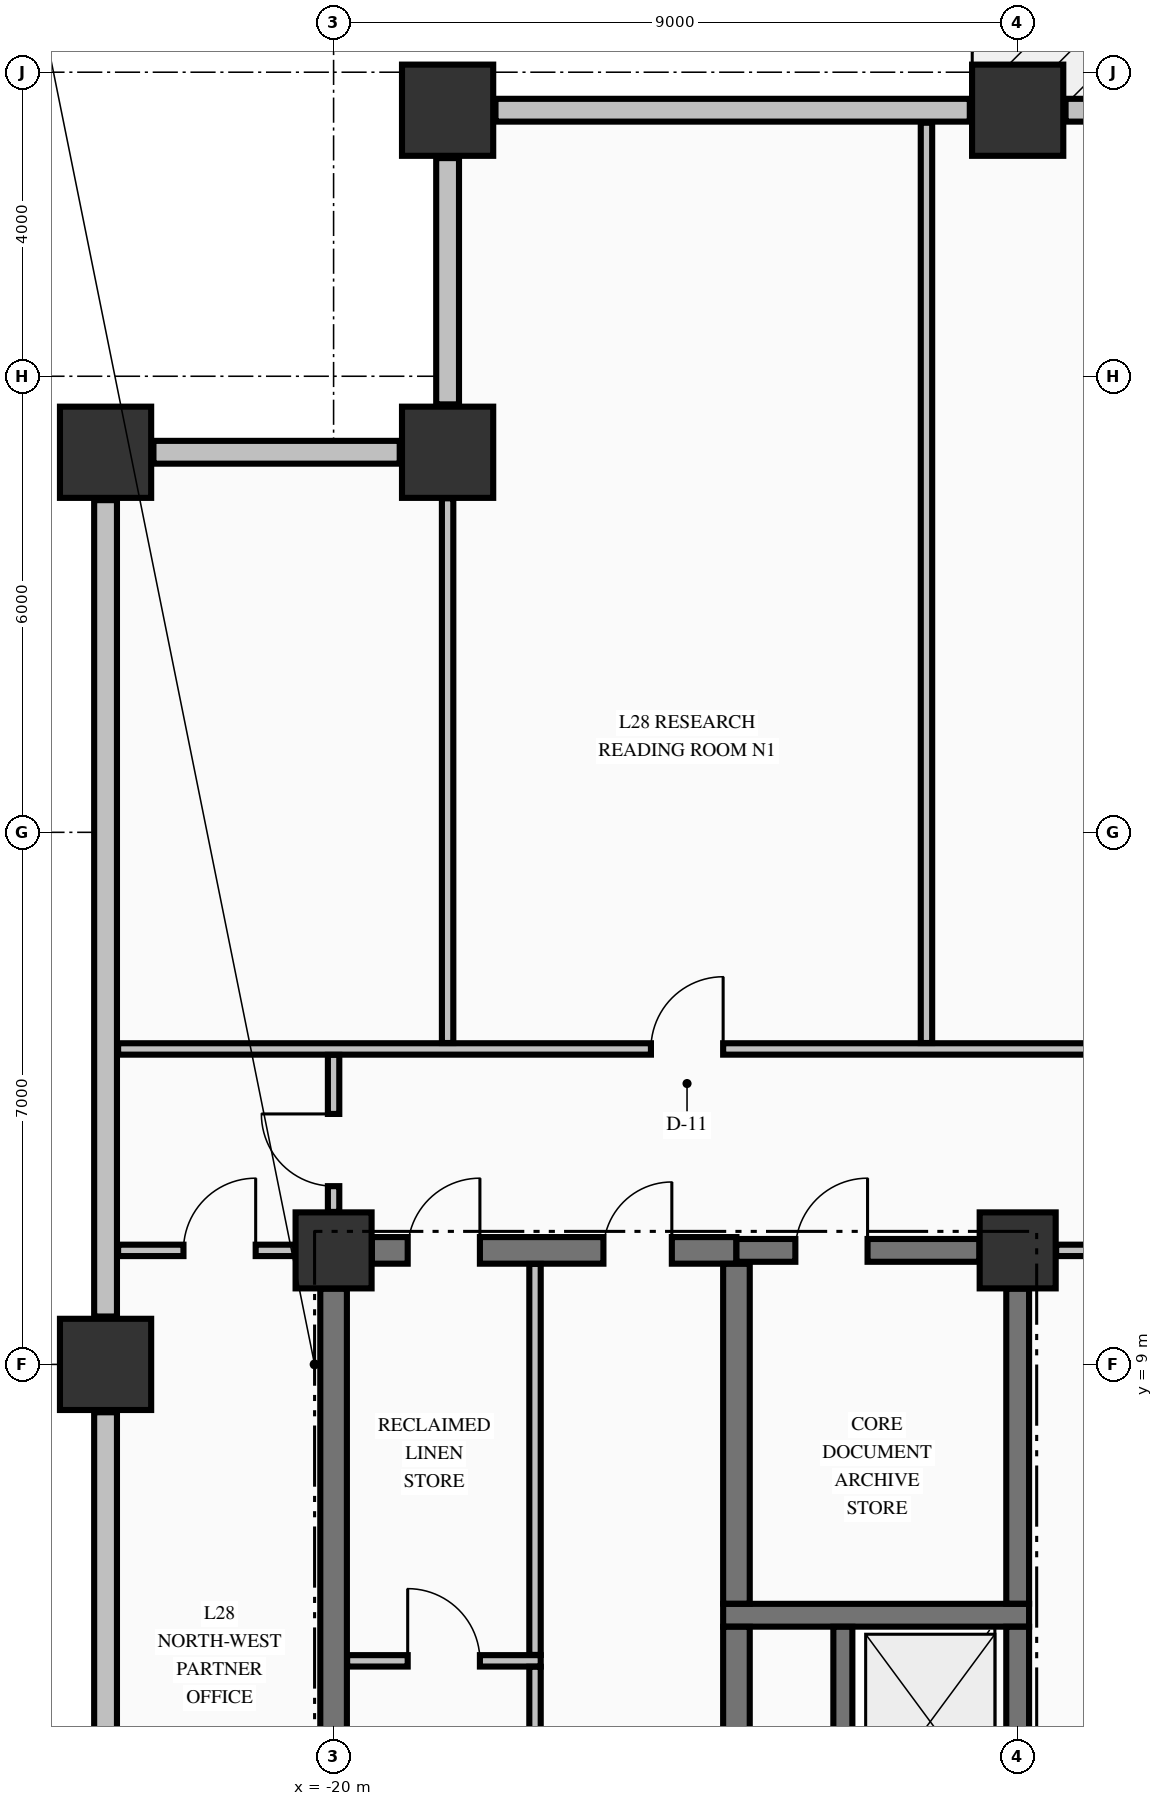
"""IFC4 building model, lengths in metres.
Left out: names, types, materials, properties, quantities, classifications, styles, units other than length and angle.
Written with IfcOpenShell. Run it as: python <this file> out.ifc"""

import sys

from ifc_helpers import new_model, si_unit, direction, frame, frame_2d, origin, origin_2d, place, context, subcontext, project, spatial, rectangle, extrude, element, fill, save


model = new_model("IFC4")
c1 = context("Model", 3, precision=1e-05, world=origin(), true_north=direction((0.0, 1.0)))
c2 = subcontext(c1, "Body", "Model", "MODEL_VIEW")
j1 = project(units=[si_unit("LENGTHUNIT", "METRE"), si_unit("PLANEANGLEUNIT", "RADIAN")], contexts=[c1])
p1 = place(None, origin())
s1 = spatial("IfcSite", under=j1, at=p1, CompositionType="ELEMENT")
p2 = place(p1, origin())
s2 = spatial("IfcBuilding", under=s1, at=p2, CompositionType="ELEMENT")
p3 = place(p2, frame((0.0, 0.0, 112.78)))
s3 = spatial("IfcBuildingStorey", under=s2, at=p3, CompositionType="ELEMENT", Elevation=112.78)
for number, where, z_axis, x_axis in (
    (1, (-18.5, 25.5, -0.25), (0.0, 0.0, 1.0), (1.0, 0.0, 0.0)),
    (2, (-11.0, 25.5, -0.25), (0.0, 0.0, 1.0), (1.0, 0.0, 0.0)),
    (3, (-23.0, 9.0, -0.25), (0.0, 0.0, 1.0), (1.0, 0.0, 0.0)),
    (4, (-23.0, 21.0, -0.25), (0.0, 0.0, 1.0), (1.0, 0.0, 0.0)),
    (5, (-18.5, 21.0, -0.25), (0.0, 0.0, 1.0), (1.0, 0.0, 0.0)),
):
    element("IfcColumn", number, at=place(p3, frame(where, z_axis=z_axis, x_axis=x_axis)), inside=s3, PredefinedType="COLUMN", context=c2, shape_type="SweptSolid", body=[
        extrude(rectangle(XDim=1.2, YDim=1.2, at=origin_2d()), origin(), (0.0, 0.0, 1.0), 3.395),
    ])
for number, where, z_axis, x_axis in (
    (6, (-20.0, 10.5, -0.25), (0.0, 0.0, 1.0), (1.0, 0.0, 0.0)),
    (7, (-11.0, 10.5, -0.25), (0.0, 0.0, 1.0), (1.0, 0.0, 0.0)),
):
    element("IfcColumn", number, at=place(p3, frame(where, z_axis=z_axis, x_axis=x_axis)), inside=s3, PredefinedType="COLUMN", context=c2, shape_type="SweptSolid", body=[
        extrude(rectangle(XDim=1.0, YDim=1.0, at=origin_2d()), origin(), (0.0, 0.0, 1.0), 3.395),
    ])
for number, where, z_axis, x_axis in (
    (8, (-18.5, 24.87, 0.0), (0.0, 0.0, 1.0), (0.0, -1.0, 0.0)),
    (9, (-19.13, 21.0, 0.0), (0.0, 0.0, 1.0), (-1.0, 0.0, 0.0)),
):
    element("IfcWall", number, at=place(p3, frame(where, z_axis=z_axis, x_axis=x_axis)), inside=s3, PredefinedType="STANDARD", context=c2, shape_type="SweptSolid", body=[
        extrude(rectangle(XDim=3.24, YDim=0.3, at=frame_2d((1.62, 0.0))), origin(), (0.0, 0.0, 1.0), 2.537),
    ])
p4 = place(p3, frame((-11.63, 25.5, 0.0), z_axis=(0.0, 0.0, 1.0), x_axis=(-1.0, 0.0, 0.0)))
e10 = element("IfcWall", 10, at=p4, inside=s3, PredefinedType="STANDARD", context=c2, shape_type="SweptSolid", body=[
    extrude(rectangle(XDim=6.24, YDim=0.3, at=frame_2d((3.12, 0.0))), origin(), (0.0, 0.0, 1.0), 2.537),
])
p5 = place(p3, frame((-0.63, 25.5, 0.0), z_axis=(0.0, 0.0, 1.0), x_axis=(-1.0, 0.0, 0.0)))
e11 = element("IfcWall", 11, at=p5, inside=s3, PredefinedType="STANDARD", context=c2, shape_type="SweptSolid", body=[
    extrude(rectangle(XDim=9.74, YDim=0.3, at=frame_2d((4.87, 0.0))), origin(), (0.0, 0.0, 1.0), 2.537),
])
p6 = place(p5, frame((6.38, 0.0, 0.0)))
e12 = element("IfcOpeningElement", 12, at=p6, cuts=e11, PredefinedType="OPENING", context=c2, shape_type="SweptSolid", body=[
    extrude(rectangle(XDim=1.1, YDim=2.15, at=frame_2d((0.55, 1.075))), frame((0.0, 0.16, 0.0), z_axis=(0.0, -1.0, 0.0), x_axis=(1.0, 0.0, 0.0)), (0.0, 0.0, 1.0), 0.32),
])
p7 = place(p3, frame((-23.0, 8.37, 0.0), z_axis=(0.0, 0.0, 1.0), x_axis=(0.0, -1.0, 0.0)))
e13 = element("IfcWall", 13, at=p7, inside=s3, PredefinedType="STANDARD", context=c2, shape_type="SweptSolid", body=[
    extrude(rectangle(XDim=7.74, YDim=0.3, at=frame_2d((3.87, 0.0))), origin(), (0.0, 0.0, 1.0), 2.537),
])
p8 = place(p3, frame((-23.0, 20.37, 0.0), z_axis=(0.0, 0.0, 1.0), x_axis=(0.0, -1.0, 0.0)))
e14 = element("IfcWall", 14, at=p8, inside=s3, PredefinedType="STANDARD", context=c2, shape_type="SweptSolid", body=[
    extrude(rectangle(XDim=10.74, YDim=0.3, at=frame_2d((5.37, 0.0))), origin(), (0.0, 0.0, 1.0), 2.537),
])
p9 = place(p3, frame((-14.875, 5.7, 0.0), z_axis=(0.0, 0.0, 1.0), x_axis=(1.0, 0.0, 0.0)))
e15 = element("IfcWall", 15, at=p9, inside=s3, PredefinedType="SHEAR", context=c2, shape_type="SweptSolid", body=[
    extrude(rectangle(XDim=4.025, YDim=0.3, at=frame_2d((2.012, 0.0))), origin(), (0.0, 0.0, 1.0), 3.145),
])
p10 = place(p3, frame((-19.496, 10.5, 0.0), z_axis=(0.0, 0.0, 1.0), x_axis=(1.0, 0.0, 0.0)))
e16 = element("IfcWall", 16, at=p10, inside=s3, PredefinedType="SHEAR", context=c2, shape_type="SweptSolid", body=[
    extrude(rectangle(XDim=4.796, YDim=0.35, at=frame_2d((2.398, 0.0))), origin(), (0.0, 0.0, 1.0), 3.145),
])
p11 = place(p10, frame((0.471, 0.0, 0.0)))
e17 = element("IfcOpeningElement", 17, at=p11, cuts=e16, PredefinedType="OPENING", context=c2, shape_type="SweptSolid", body=[
    extrude(rectangle(XDim=0.95, YDim=2.15, at=frame_2d((0.475, 1.075))), frame((0.0, 0.185, 0.0), z_axis=(0.0, -1.0, 0.0), x_axis=(1.0, 0.0, 0.0)), (0.0, 0.0, 1.0), 0.37),
])
p12 = place(p10, frame((3.046, 0.0, 0.0)))
e18 = element("IfcOpeningElement", 18, at=p12, cuts=e16, PredefinedType="OPENING", context=c2, shape_type="SweptSolid", body=[
    extrude(rectangle(XDim=0.9, YDim=2.15, at=frame_2d((0.45, 1.075))), frame((0.0, 0.185, 0.0), z_axis=(0.0, -1.0, 0.0), x_axis=(1.0, 0.0, 0.0)), (0.0, 0.0, 1.0), 0.37),
])
p13 = place(p3, frame((-14.7, 10.5, 0.0), z_axis=(0.0, 0.0, 1.0), x_axis=(1.0, 0.0, 0.0)))
e19 = element("IfcWall", 19, at=p13, inside=s3, PredefinedType="SHEAR", context=c2, shape_type="SweptSolid", body=[
    extrude(rectangle(XDim=3.196, YDim=0.3, at=frame_2d((1.598, 0.0))), origin(), (0.0, 0.0, 1.0), 3.145),
])
p14 = place(p13, frame((0.775, 0.0, 0.0)))
e20 = element("IfcOpeningElement", 20, at=p14, cuts=e19, PredefinedType="OPENING", context=c2, shape_type="SweptSolid", body=[
    extrude(rectangle(XDim=0.95, YDim=2.15, at=frame_2d((0.475, 1.075))), frame((0.0, 0.16, 0.0), z_axis=(0.0, -1.0, 0.0), x_axis=(1.0, 0.0, 0.0)), (0.0, 0.0, 1.0), 0.32),
])
p15 = place(p3, frame((-19.822, 5.1, 0.0), z_axis=(0.0, 0.0, 1.0), x_axis=(1.0, 0.0, 0.0)))
e21 = element("IfcWall", 21, at=p15, inside=s3, PredefinedType="PARTITIONING", context=c2, shape_type="SweptSolid", body=[
    extrude(rectangle(XDim=2.547, YDim=0.15, at=frame_2d((1.273, 0.0))), origin(), (0.0, 0.0, 1.0), 3.145),
])
p16 = place(p15, frame((0.797, 0.0, 0.0)))
e22 = element("IfcOpeningElement", 22, at=p16, cuts=e21, PredefinedType="OPENING", context=c2, shape_type="SweptSolid", body=[
    extrude(rectangle(XDim=0.95, YDim=2.15, at=frame_2d((0.475, 1.075))), frame((0.0, 0.085, 0.0), z_axis=(0.0, -1.0, 0.0), x_axis=(1.0, 0.0, 0.0)), (0.0, 0.0, 1.0), 0.17),
])
p17 = place(p3, frame((-22.835, 10.5, 0.0), z_axis=(0.0, 0.0, 1.0), x_axis=(1.0, 0.0, 0.0)))
e23 = element("IfcWall", 23, at=p17, inside=s3, PredefinedType="PARTITIONING", context=c2, shape_type="SweptSolid", body=[
    extrude(rectangle(XDim=2.329, YDim=0.15, at=frame_2d((1.165, 0.0))), origin(), (0.0, 0.0, 1.0), 3.145),
])
p18 = place(p17, frame((0.86, 0.0, 0.0)))
e24 = element("IfcOpeningElement", 24, at=p18, cuts=e23, PredefinedType="OPENING", context=c2, shape_type="SweptSolid", body=[
    extrude(rectangle(XDim=0.95, YDim=2.15, at=frame_2d((0.475, 1.075))), frame((0.0, 0.085, 0.0), z_axis=(0.0, -1.0, 0.0), x_axis=(1.0, 0.0, 0.0)), (0.0, 0.0, 1.0), 0.17),
])
p19 = place(p3, frame((-10.494, 10.5, 0.0), z_axis=(0.0, 0.0, 1.0), x_axis=(1.0, 0.0, 0.0)))
e25 = element("IfcWall", 25, at=p19, inside=s3, PredefinedType="PARTITIONING", context=c2, shape_type="SweptSolid", body=[
    extrude(rectangle(XDim=20.988, YDim=0.15, at=frame_2d((10.494, 0.0))), origin(), (0.0, 0.0, 1.0), 3.145),
])
p20 = place(p19, frame((13.994, 0.0, 0.0)))
e26 = element("IfcOpeningElement", 26, at=p20, cuts=e25, PredefinedType="OPENING", context=c2, shape_type="SweptSolid", body=[
    extrude(rectangle(XDim=1.1, YDim=2.15, at=frame_2d((0.55, 1.075))), frame((0.0, 0.085, 0.0), z_axis=(0.0, -1.0, 0.0), x_axis=(1.0, 0.0, 0.0)), (0.0, 0.0, 1.0), 0.17),
])
p21 = place(p3, frame((-22.835, 13.15, 0.0), z_axis=(0.0, 0.0, 1.0), x_axis=(1.0, 0.0, 0.0)))
e27 = element("IfcWall", 27, at=p21, inside=s3, PredefinedType="PARTITIONING", context=c2, shape_type="SweptSolid", body=[
    extrude(rectangle(XDim=50.67, YDim=0.15, at=frame_2d((25.335, 0.0))), origin(), (0.0, 0.0, 1.0), 3.145),
])
p22 = place(p21, frame((7.01, 0.0, 0.0)))
e28 = element("IfcOpeningElement", 28, at=p22, cuts=e27, PredefinedType="OPENING", context=c2, shape_type="SweptSolid", body=[
    extrude(rectangle(XDim=0.95, YDim=2.15, at=frame_2d((0.475, 1.075))), frame((0.0, 0.085, 0.0), z_axis=(0.0, -1.0, 0.0), x_axis=(1.0, 0.0, 0.0)), (0.0, 0.0, 1.0), 0.17),
])
p23 = place(p21, frame((14.91, 0.0, 0.0)))
e29 = element("IfcOpeningElement", 29, at=p23, cuts=e27, PredefinedType="OPENING", context=c2, shape_type="SweptSolid", body=[
    extrude(rectangle(XDim=1.05, YDim=2.15, at=frame_2d((0.525, 1.075))), frame((0.0, 0.085, 0.0), z_axis=(0.0, -1.0, 0.0), x_axis=(1.0, 0.0, 0.0)), (0.0, 0.0, 1.0), 0.17),
])
p24 = place(p21, frame((24.71, 0.0, 0.0)))
e30 = element("IfcOpeningElement", 30, at=p24, cuts=e27, PredefinedType="OPENING", context=c2, shape_type="SweptSolid", body=[
    extrude(rectangle(XDim=1.05, YDim=2.15, at=frame_2d((0.525, 1.075))), frame((0.0, 0.085, 0.0), z_axis=(0.0, -1.0, 0.0), x_axis=(1.0, 0.0, 0.0)), (0.0, 0.0, 1.0), 0.17),
])
p25 = place(p21, frame((35.91, 0.0, 0.0)))
e31 = element("IfcOpeningElement", 31, at=p25, cuts=e27, PredefinedType="OPENING", context=c2, shape_type="SweptSolid", body=[
    extrude(rectangle(XDim=1.05, YDim=2.15, at=frame_2d((0.525, 1.075))), frame((0.0, 0.085, 0.0), z_axis=(0.0, -1.0, 0.0), x_axis=(1.0, 0.0, 0.0)), (0.0, 0.0, 1.0), 0.17),
])
p26 = place(p3, frame((-20.0, 0.504, 0.0), z_axis=(0.0, 0.0, 1.0), x_axis=(0.0, 1.0, 0.0)))
e32 = element("IfcWall", 32, at=p26, inside=s3, PredefinedType="SHEAR", context=c2, shape_type="SweptSolid", body=[
    extrude(rectangle(XDim=9.492, YDim=0.35, at=frame_2d((4.746, 0.0))), origin(), (0.0, 0.0, 1.0), 3.145),
])
p27 = place(p3, frame((-14.7, 3.052, 0.0), z_axis=(0.0, 0.0, 1.0), x_axis=(0.0, 1.0, 0.0)))
e33 = element("IfcWall", 33, at=p27, inside=s3, PredefinedType="SHEAR", context=c2, shape_type="SweptSolid", body=[
    extrude(rectangle(XDim=2.496, YDim=0.35, at=frame_2d((1.248, 0.0))), origin(), (0.0, 0.0, 1.0), 3.145),
])
p28 = place(p3, frame((-14.7, 5.852, 0.0), z_axis=(0.0, 0.0, 1.0), x_axis=(0.0, 1.0, 0.0)))
e34 = element("IfcWall", 34, at=p28, inside=s3, PredefinedType="SHEAR", context=c2, shape_type="SweptSolid", body=[
    extrude(rectangle(XDim=4.471, YDim=0.35, at=frame_2d((2.235, 0.0))), origin(), (0.0, 0.0, 1.0), 3.145),
])
p29 = place(p3, frame((-13.3, 3.052, 0.0), z_axis=(0.0, 0.0, 1.0), x_axis=(0.0, 1.0, 0.0)))
e35 = element("IfcWall", 35, at=p29, inside=s3, PredefinedType="SOLIDWALL", context=c2, shape_type="SweptSolid", body=[
    extrude(rectangle(XDim=2.496, YDim=0.25, at=frame_2d((1.248, 0.0))), origin(), (0.0, 0.0, 1.0), 3.145),
])
p30 = place(p3, frame((-11.0, 3.052, 0.0), z_axis=(0.0, 0.0, 1.0), x_axis=(0.0, 1.0, 0.0)))
e36 = element("IfcWall", 36, at=p30, inside=s3, PredefinedType="SHEAR", context=c2, shape_type="SweptSolid", body=[
    extrude(rectangle(XDim=2.496, YDim=0.3, at=frame_2d((1.248, 0.0))), origin(), (0.0, 0.0, 1.0), 3.145),
])
p31 = place(p3, frame((-11.0, 5.852, 0.0), z_axis=(0.0, 0.0, 1.0), x_axis=(0.0, 1.0, 0.0)))
e37 = element("IfcWall", 37, at=p31, inside=s3, PredefinedType="SHEAR", context=c2, shape_type="SweptSolid", body=[
    extrude(rectangle(XDim=4.144, YDim=0.3, at=frame_2d((2.072, 0.0))), origin(), (0.0, 0.0, 1.0), 3.145),
])
p32 = place(p3, frame((-20.0, 11.006, 0.0), z_axis=(0.0, 0.0, 1.0), x_axis=(0.0, 1.0, 0.0)))
e38 = element("IfcWall", 38, at=p32, inside=s3, PredefinedType="PARTITIONING", context=c2, shape_type="SweptSolid", body=[
    extrude(rectangle(XDim=2.066, YDim=0.15, at=frame_2d((1.033, 0.0))), origin(), (0.0, 0.0, 1.0), 2.635),
])
p33 = place(p32, frame((0.339, 0.0, 0.0)))
e39 = element("IfcOpeningElement", 39, at=p33, cuts=e38, PredefinedType="OPENING", context=c2, shape_type="SweptSolid", body=[
    extrude(rectangle(XDim=0.95, YDim=2.15, at=frame_2d((0.475, 1.075))), frame((0.0, 0.085, 0.0), z_axis=(0.0, -1.0, 0.0), x_axis=(1.0, 0.0, 0.0)), (0.0, 0.0, 1.0), 0.17),
])
p34 = place(p3, frame((-18.5, 13.228, 0.0), z_axis=(0.0, 0.0, 1.0), x_axis=(0.0, 1.0, 0.0)))
e40 = element("IfcWall", 40, at=p34, inside=s3, PredefinedType="PARTITIONING", context=c2, shape_type="SweptSolid", body=[
    extrude(rectangle(XDim=7.166, YDim=0.15, at=frame_2d((3.583, 0.0))), origin(), (0.0, 0.0, 1.0), 3.145),
])
p35 = place(p3, frame((-17.35, -0.097, 0.0), z_axis=(0.0, 0.0, 1.0), x_axis=(0.0, 1.0, 0.0)))
e41 = element("IfcWall", 41, at=p35, inside=s3, PredefinedType="PARTITIONING", context=c2, shape_type="SweptSolid", body=[
    extrude(rectangle(XDim=5.119, YDim=0.15, at=frame_2d((2.56, 0.0))), origin(), (0.0, 0.0, 1.0), 3.145),
])
p36 = place(p3, frame((-17.35, 5.178, 0.0), z_axis=(0.0, 0.0, 1.0), x_axis=(0.0, 1.0, 0.0)))
e42 = element("IfcWall", 42, at=p36, inside=s3, PredefinedType="PARTITIONING", context=c2, shape_type="SweptSolid", body=[
    extrude(rectangle(XDim=5.144, YDim=0.15, at=frame_2d((2.572, 0.0))), origin(), (0.0, 0.0, 1.0), 3.145),
])
p37 = place(p3, frame((-12.2, 13.228, 0.0), z_axis=(0.0, 0.0, 1.0), x_axis=(0.0, 1.0, 0.0)))
e43 = element("IfcWall", 43, at=p37, inside=s3, PredefinedType="PARTITIONING", context=c2, shape_type="SweptSolid", body=[
    extrude(rectangle(XDim=12.107, YDim=0.15, at=frame_2d((6.053, 0.0))), origin(), (0.0, 0.0, 1.0), 3.145),
])
p38 = place(p14, origin())
e44 = element("IfcDoor", 44, at=p38, inside=s3, OperationType="SINGLE_SWING_RIGHT", PredefinedType="DOOR", context=c2, shape_type="SweptSolid", body=[
    extrude(rectangle(XDim=0.95, YDim=2.15, at=frame_2d((0.475, 1.075))), frame((0.0, 0.025, 0.0), z_axis=(0.0, -1.0, 0.0), x_axis=(1.0, 0.0, 0.0)), (0.0, 0.0, 1.0), 0.05),
])
fill(e20, e44)
p39 = place(p11, origin())
e45 = element("IfcDoor", 45, at=p39, inside=s3, OperationType="SINGLE_SWING_RIGHT", PredefinedType="DOOR", context=c2, shape_type="SweptSolid", body=[
    extrude(rectangle(XDim=0.95, YDim=2.15, at=frame_2d((0.475, 1.075))), frame((0.0, 0.025, 0.0), z_axis=(0.0, -1.0, 0.0), x_axis=(1.0, 0.0, 0.0)), (0.0, 0.0, 1.0), 0.05),
])
fill(e17, e45)
p40 = place(p16, origin())
e46 = element("IfcDoor", 46, at=p40, inside=s3, OperationType="SINGLE_SWING_LEFT", PredefinedType="DOOR", context=c2, shape_type="SweptSolid", body=[
    extrude(rectangle(XDim=0.95, YDim=2.15, at=frame_2d((0.475, 1.075))), frame((0.0, 0.025, 0.0), z_axis=(0.0, -1.0, 0.0), x_axis=(1.0, 0.0, 0.0)), (0.0, 0.0, 1.0), 0.05),
])
fill(e22, e46)
p41 = place(p12, origin())
e47 = element("IfcDoor", 47, at=p41, inside=s3, OperationType="SINGLE_SWING_RIGHT", PredefinedType="DOOR", context=c2, shape_type="SweptSolid", body=[
    extrude(rectangle(XDim=0.9, YDim=2.15, at=frame_2d((0.45, 1.075))), frame((0.0, 0.025, 0.0), z_axis=(0.0, -1.0, 0.0), x_axis=(1.0, 0.0, 0.0)), (0.0, 0.0, 1.0), 0.05),
])
fill(e18, e47)
p42 = place(p22, origin())
e48 = element("IfcDoor", 48, at=p42, inside=s3, OperationType="SINGLE_SWING_RIGHT", PredefinedType="DOOR", context=c2, shape_type="SweptSolid", body=[
    extrude(rectangle(XDim=0.95, YDim=2.15, at=frame_2d((0.475, 1.075))), frame((0.0, 0.025, 0.0), z_axis=(0.0, -1.0, 0.0), x_axis=(1.0, 0.0, 0.0)), (0.0, 0.0, 1.0), 0.05),
])
fill(e28, e48)
p43 = place(p33, origin())
e49 = element("IfcDoor", 49, at=p43, inside=s3, OperationType="SINGLE_SWING_RIGHT", PredefinedType="DOOR", context=c2, shape_type="SweptSolid", body=[
    extrude(rectangle(XDim=0.95, YDim=2.15, at=frame_2d((0.475, 1.075))), frame((0.0, 0.025, 0.0), z_axis=(0.0, -1.0, 0.0), x_axis=(1.0, 0.0, 0.0)), (0.0, 0.0, 1.0), 0.05),
])
fill(e39, e49)
p44 = place(p18, origin())
e50 = element("IfcDoor", 50, at=p44, inside=s3, OperationType="SINGLE_SWING_RIGHT", PredefinedType="DOOR", context=c2, shape_type="SweptSolid", body=[
    extrude(rectangle(XDim=0.95, YDim=2.15, at=frame_2d((0.475, 1.075))), frame((0.0, 0.025, 0.0), z_axis=(0.0, -1.0, 0.0), x_axis=(1.0, 0.0, 0.0)), (0.0, 0.0, 1.0), 0.05),
])
fill(e24, e50)
save(model, sys.argv[1])
